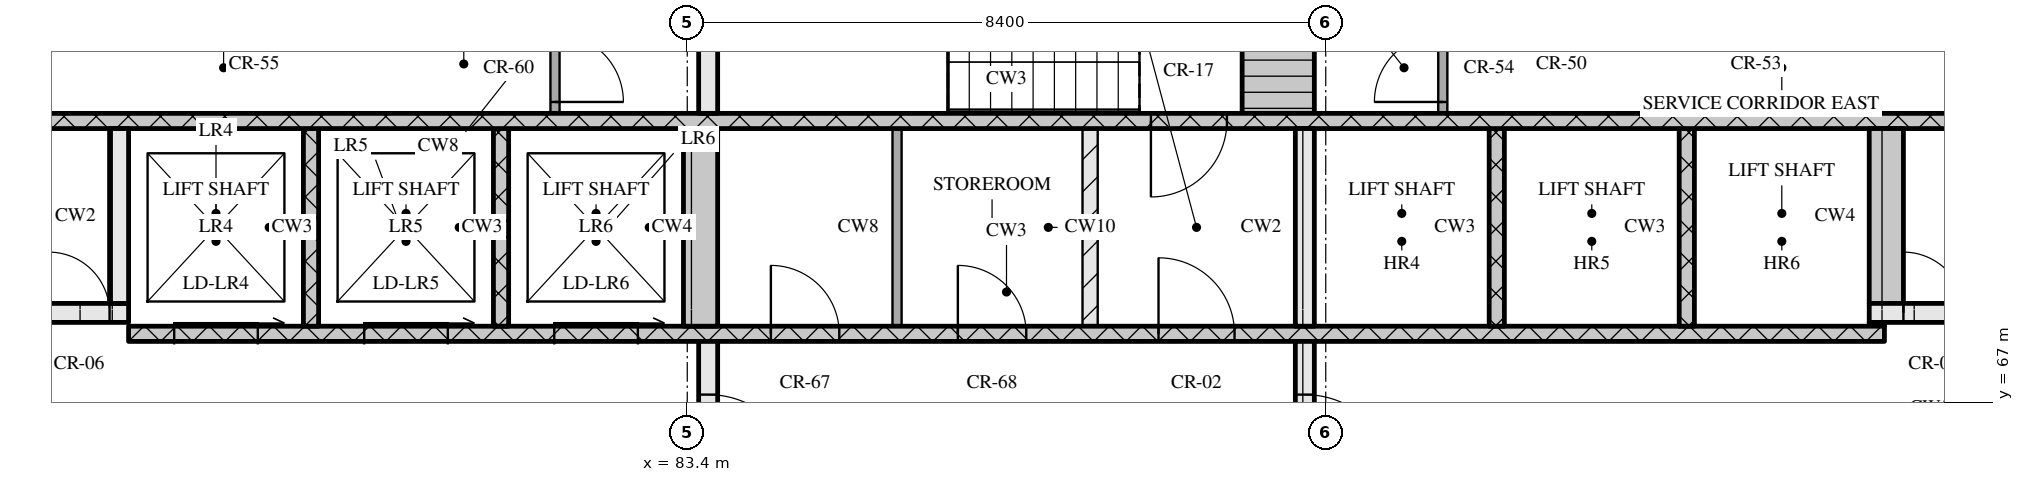
"""IFC4 building model, lengths in metres.
Left out: names, types, materials, properties, quantities, classifications, styles, units other than length and angle.
Written with IfcOpenShell. Run it as: python <this file> out.ifc"""

import sys

from ifc_helpers import new_model, si_unit, direction, frame, frame_2d, origin, place, context, subcontext, project, spatial, rectangle, extrude, element, fill, save


model = new_model("IFC4")
c1 = context("Model", 3, precision=1e-05, world=origin(), true_north=direction((0.0, 1.0)))
c2 = subcontext(c1, "Body", "Model", "MODEL_VIEW")
j1 = project(units=[si_unit("LENGTHUNIT", "METRE"), si_unit("PLANEANGLEUNIT", "RADIAN")], contexts=[c1])
p1 = place(None, origin())
s1 = spatial("IfcSite", under=j1, at=p1, CompositionType="ELEMENT")
p2 = place(p1, origin())
s2 = spatial("IfcBuilding", under=s1, at=p2, CompositionType="ELEMENT")
p3 = place(p2, frame((0.0, 0.0, 95.25)))
s3 = spatial("IfcBuildingStorey", under=s2, at=p3, CompositionType="ELEMENT", Elevation=95.25)
p4 = place(p3, frame((83.675, 65.2, 0.0), z_axis=(0.0, 0.0, 1.0), x_axis=(0.0, 1.0, 0.0)))
e1 = element("IfcWall", 1, at=p4, inside=s3, PredefinedType="SOLIDWALL", context=c2, shape_type="SweptSolid", body=[
    extrude(rectangle(XDim=2.6, YDim=0.25, at=frame_2d((1.3, 0.0))), origin(), (0.0, 0.0, 1.0), 3.32),
])
p5 = place(p4, frame((0.7, 0.0, 0.0)))
e2 = element("IfcOpeningElement", 2, at=p5, cuts=e1, PredefinedType="OPENING", context=c2, shape_type="SweptSolid", body=[
    extrude(rectangle(XDim=1.2, YDim=2.1, at=frame_2d((0.6, 1.05))), frame((0.0, 0.135, 0.0), z_axis=(0.0, -1.0, 0.0), x_axis=(1.0, 0.0, 0.0)), (0.0, 0.0, 1.0), 0.27),
])
p6 = place(p3, frame((91.525, 65.2, 0.0), z_axis=(0.0, 0.0, 1.0), x_axis=(0.0, 1.0, 0.0)))
e3 = element("IfcWall", 3, at=p6, inside=s3, PredefinedType="SOLIDWALL", context=c2, shape_type="SweptSolid", body=[
    extrude(rectangle(XDim=2.6, YDim=0.25, at=frame_2d((1.3, 0.0))), origin(), (0.0, 0.0, 1.0), 3.32),
])
p7 = place(p6, frame((0.7, 0.0, 0.0)))
e4 = element("IfcOpeningElement", 4, at=p7, cuts=e3, PredefinedType="OPENING", context=c2, shape_type="SweptSolid", body=[
    extrude(rectangle(XDim=1.2, YDim=2.1, at=frame_2d((0.6, 1.05))), frame((0.0, 0.135, 0.0), z_axis=(0.0, -1.0, 0.0), x_axis=(1.0, 0.0, 0.0)), (0.0, 0.0, 1.0), 0.27),
])
p8 = place(p3, frame((76.05, 67.9, 0.0), z_axis=(0.0, 0.0, 1.0), x_axis=(1.0, 0.0, 0.0)))
e5 = element("IfcWall", 5, at=p8, inside=s3, PredefinedType="SOLIDWALL", context=c2, shape_type="SweptSolid", body=[
    extrude(rectangle(XDim=23.1, YDim=0.2, at=frame_2d((11.55, 0.0))), origin(), (0.0, 0.0, 1.0), 3.32),
])
p9 = place(p8, frame((0.6, 0.0, 0.0)))
e6 = element("IfcOpeningElement", 6, at=p9, cuts=e5, PredefinedType="OPENING", context=c2, shape_type="SweptSolid", body=[
    extrude(rectangle(XDim=1.1, YDim=2.1, at=frame_2d((0.55, 1.05))), frame((0.0, 0.11, 0.0), z_axis=(0.0, -1.0, 0.0), x_axis=(1.0, 0.0, 0.0)), (0.0, 0.0, 1.0), 0.22),
])
p10 = place(p8, frame((3.1, 0.0, 0.0)))
e7 = element("IfcOpeningElement", 7, at=p10, cuts=e5, PredefinedType="OPENING", context=c2, shape_type="SweptSolid", body=[
    extrude(rectangle(XDim=1.1, YDim=2.1, at=frame_2d((0.55, 1.05))), frame((0.0, 0.11, 0.0), z_axis=(0.0, -1.0, 0.0), x_axis=(1.0, 0.0, 0.0)), (0.0, 0.0, 1.0), 0.22),
])
p11 = place(p8, frame((5.6, 0.0, 0.0)))
e8 = element("IfcOpeningElement", 8, at=p11, cuts=e5, PredefinedType="OPENING", context=c2, shape_type="SweptSolid", body=[
    extrude(rectangle(XDim=1.1, YDim=2.1, at=frame_2d((0.55, 1.05))), frame((0.0, 0.11, 0.0), z_axis=(0.0, -1.0, 0.0), x_axis=(1.0, 0.0, 0.0)), (0.0, 0.0, 1.0), 0.22),
])
p12 = place(p8, frame((8.45, 0.0, 0.0)))
e9 = element("IfcOpeningElement", 9, at=p12, cuts=e5, PredefinedType="OPENING", context=c2, shape_type="SweptSolid", body=[
    extrude(rectangle(XDim=0.9, YDim=2.1, at=frame_2d((0.45, 1.05))), frame((0.0, 0.11, 0.0), z_axis=(0.0, -1.0, 0.0), x_axis=(1.0, 0.0, 0.0)), (0.0, 0.0, 1.0), 0.22),
])
p13 = place(p8, frame((10.91, 0.0, 0.0)))
e10 = element("IfcOpeningElement", 10, at=p13, cuts=e5, PredefinedType="OPENING", context=c2, shape_type="SweptSolid", body=[
    extrude(rectangle(XDim=0.9, YDim=2.1, at=frame_2d((0.45, 1.05))), frame((0.0, 0.11, 0.0), z_axis=(0.0, -1.0, 0.0), x_axis=(1.0, 0.0, 0.0)), (0.0, 0.0, 1.0), 0.22),
])
p14 = place(p8, frame((13.55, 0.0, 0.0)))
e11 = element("IfcOpeningElement", 11, at=p14, cuts=e5, PredefinedType="OPENING", context=c2, shape_type="SweptSolid", body=[
    extrude(rectangle(XDim=1.0, YDim=2.1, at=frame_2d((0.5, 1.05))), frame((0.0, 0.11, 0.0), z_axis=(0.0, -1.0, 0.0), x_axis=(1.0, 0.0, 0.0)), (0.0, 0.0, 1.0), 0.22),
])
for number, where, z_axis, x_axis in (
    (12, (78.45, 68.0, 0.0), (0.0, 0.0, 1.0), (0.0, 1.0, 0.0)),
    (13, (80.95, 68.0, 0.0), (0.0, 0.0, 1.0), (0.0, 1.0, 0.0)),
):
    element("IfcWall", number, at=place(p3, frame(where, z_axis=z_axis, x_axis=x_axis)), inside=s3, PredefinedType="SOLIDWALL", context=c2, shape_type="SweptSolid", body=[
        extrude(rectangle(XDim=2.6, YDim=0.2, at=frame_2d((1.3, 0.0))), origin(), (0.0, 0.0, 1.0), 3.32),
    ])
p15 = place(p3, frame((83.575, 68.0, 0.0), z_axis=(0.0, 0.0, 1.0), x_axis=(0.0, 1.0, 0.0)))
e14 = element("IfcWall", 14, at=p15, inside=s3, PredefinedType="SOLIDWALL", context=c2, shape_type="SweptSolid", body=[
    extrude(rectangle(XDim=2.6, YDim=0.45, at=frame_2d((1.3, 0.0))), origin(), (0.0, 0.0, 1.0), 3.32),
])
p16 = place(p3, frame((86.16, 68.0, 0.0), z_axis=(0.0, 0.0, 1.0), x_axis=(0.0, 1.0, 0.0)))
e15 = element("IfcWall", 15, at=p16, inside=s3, PredefinedType="PARTITIONING", context=c2, shape_type="SweptSolid", body=[
    extrude(rectangle(XDim=2.6, YDim=0.12, at=frame_2d((1.3, 0.0))), origin(), (0.0, 0.0, 1.0), 3.32),
])
p17 = place(p3, frame((88.7, 68.0, 0.0), z_axis=(0.0, 0.0, 1.0), x_axis=(0.0, 1.0, 0.0)))
e16 = element("IfcWall", 16, at=p17, inside=s3, PredefinedType="PARTITIONING", context=c2, shape_type="SweptSolid", body=[
    extrude(rectangle(XDim=2.6, YDim=0.2, at=frame_2d((1.3, 0.0))), origin(), (0.0, 0.0, 1.0), 3.32),
])
p18 = place(p3, frame((91.525, 68.0, 0.0), z_axis=(0.0, 0.0, 1.0), x_axis=(0.0, 1.0, 0.0)))
e17 = element("IfcWall", 17, at=p18, inside=s3, PredefinedType="SOLIDWALL", context=c2, shape_type="SweptSolid", body=[
    extrude(rectangle(XDim=2.6, YDim=0.25, at=frame_2d((1.3, 0.0))), origin(), (0.0, 0.0, 1.0), 3.32),
])
for number, where, z_axis, x_axis in (
    (18, (94.05, 68.0, 0.0), (0.0, 0.0, 1.0), (0.0, 1.0, 0.0)),
    (19, (96.55, 68.0, 0.0), (0.0, 0.0, 1.0), (0.0, 1.0, 0.0)),
):
    element("IfcWall", number, at=place(p3, frame(where, z_axis=z_axis, x_axis=x_axis)), inside=s3, PredefinedType="SOLIDWALL", context=c2, shape_type="SweptSolid", body=[
        extrude(rectangle(XDim=2.6, YDim=0.2, at=frame_2d((1.3, 0.0))), origin(), (0.0, 0.0, 1.0), 3.32),
    ])
p19 = place(p3, frame((98.95, 68.025, 0.0), z_axis=(0.0, 0.0, 1.0), x_axis=(1.0, 0.0, 0.0)))
e20 = element("IfcWall", 20, at=p19, inside=s3, PredefinedType="SOLIDWALL", context=c2, shape_type="SweptSolid", body=[
    extrude(rectangle(XDim=0.2, YDim=0.05, at=frame_2d((0.1, 0.0))), origin(), (0.0, 0.0, 1.0), 3.32),
])
p20 = place(p3, frame((67.8, 68.175, 0.0), z_axis=(0.0, 0.0, 1.0), x_axis=(1.0, 0.0, 0.0)))
e21 = element("IfcWall", 21, at=p20, inside=s3, PredefinedType="SOLIDWALL", context=c2, shape_type="SweptSolid", body=[
    extrude(rectangle(XDim=8.25, YDim=0.25, at=frame_2d((4.125, 0.0))), origin(), (0.0, 0.0, 1.0), 3.32),
])
p21 = place(p20, frame((5.7, 0.0, 0.0)))
e22 = element("IfcOpeningElement", 22, at=p21, cuts=e21, PredefinedType="OPENING", context=c2, shape_type="SweptSolid", body=[
    extrude(rectangle(XDim=1.0, YDim=2.1, at=frame_2d((0.5, 1.05))), frame((0.0, 0.135, 0.0), z_axis=(0.0, -1.0, 0.0), x_axis=(1.0, 0.0, 0.0)), (0.0, 0.0, 1.0), 0.27),
])
p22 = place(p20, frame((7.2, 0.0, 0.0)))
e23 = element("IfcOpeningElement", 23, at=p22, cuts=e21, PredefinedType="OPENING", context=c2, shape_type="SweptSolid", body=[
    extrude(rectangle(XDim=0.8, YDim=2.1, at=frame_2d((0.4, 1.05))), frame((0.0, 0.135, 0.0), z_axis=(0.0, -1.0, 0.0), x_axis=(1.0, 0.0, 0.0)), (0.0, 0.0, 1.0), 0.27),
])
p23 = place(p3, frame((98.95, 68.175, 0.0), z_axis=(0.0, 0.0, 1.0), x_axis=(1.0, 0.0, 0.0)))
e24 = element("IfcWall", 24, at=p23, inside=s3, PredefinedType="SOLIDWALL", context=c2, shape_type="SweptSolid", body=[
    extrude(rectangle(XDim=8.45, YDim=0.25, at=frame_2d((4.225, 0.0))), origin(), (0.0, 0.0, 1.0), 3.32),
])
p24 = place(p23, frame((0.45, 0.0, 0.0)))
e25 = element("IfcOpeningElement", 25, at=p24, cuts=e24, PredefinedType="OPENING", context=c2, shape_type="SweptSolid", body=[
    extrude(rectangle(XDim=0.8, YDim=2.1, at=frame_2d((0.4, 1.05))), frame((0.0, 0.135, 0.0), z_axis=(0.0, -1.0, 0.0), x_axis=(1.0, 0.0, 0.0)), (0.0, 0.0, 1.0), 0.27),
])
p25 = place(p23, frame((1.75, 0.0, 0.0)))
e26 = element("IfcOpeningElement", 26, at=p25, cuts=e24, PredefinedType="OPENING", context=c2, shape_type="SweptSolid", body=[
    extrude(rectangle(XDim=1.0, YDim=2.1, at=frame_2d((0.5, 1.05))), frame((0.0, 0.135, 0.0), z_axis=(0.0, -1.0, 0.0), x_axis=(1.0, 0.0, 0.0)), (0.0, 0.0, 1.0), 0.27),
])
p26 = place(p3, frame((75.925, 68.3, 0.0), z_axis=(0.0, 0.0, 1.0), x_axis=(0.0, 1.0, 0.0)))
e27 = element("IfcWall", 27, at=p26, inside=s3, PredefinedType="SOLIDWALL", context=c2, shape_type="SweptSolid", body=[
    extrude(rectangle(XDim=2.3, YDim=0.25, at=frame_2d((1.15, 0.0))), origin(), (0.0, 0.0, 1.0), 3.32),
])
p27 = place(p3, frame((99.175, 68.3, 0.0), z_axis=(0.0, 0.0, 1.0), x_axis=(0.0, 1.0, 0.0)))
e28 = element("IfcWall", 28, at=p27, inside=s3, PredefinedType="SOLIDWALL", context=c2, shape_type="SweptSolid", body=[
    extrude(rectangle(XDim=2.3, YDim=0.45, at=frame_2d((1.15, 0.0))), origin(), (0.0, 0.0, 1.0), 3.32),
])
p28 = place(p3, frame((67.8, 70.7, 0.0), z_axis=(0.0, 0.0, 1.0), x_axis=(1.0, 0.0, 0.0)))
e29 = element("IfcWall", 29, at=p28, inside=s3, PredefinedType="SOLIDWALL", context=c2, shape_type="SweptSolid", body=[
    extrude(rectangle(XDim=39.6, YDim=0.2, at=frame_2d((19.8, 0.0))), origin(), (0.0, 0.0, 1.0), 3.32),
])
p29 = place(p28, frame((0.65, 0.0, 0.0)))
e30 = element("IfcOpeningElement", 30, at=p29, cuts=e29, PredefinedType="OPENING", context=c2, shape_type="SweptSolid", body=[
    extrude(rectangle(XDim=1.1, YDim=2.1, at=frame_2d((0.55, 1.05))), frame((0.0, 0.11, 0.0), z_axis=(0.0, -1.0, 0.0), x_axis=(1.0, 0.0, 0.0)), (0.0, 0.0, 1.0), 0.22),
])
p30 = place(p28, frame((3.25, 0.0, 0.0)))
e31 = element("IfcOpeningElement", 31, at=p30, cuts=e29, PredefinedType="OPENING", context=c2, shape_type="SweptSolid", body=[
    extrude(rectangle(XDim=1.1, YDim=2.1, at=frame_2d((0.55, 1.05))), frame((0.0, 0.11, 0.0), z_axis=(0.0, -1.0, 0.0), x_axis=(1.0, 0.0, 0.0)), (0.0, 0.0, 1.0), 0.22),
])
p31 = place(p28, frame((5.9, 0.0, 0.0)))
e32 = element("IfcOpeningElement", 32, at=p31, cuts=e29, PredefinedType="OPENING", context=c2, shape_type="SweptSolid", body=[
    extrude(rectangle(XDim=1.0, YDim=2.1, at=frame_2d((0.5, 1.05))), frame((0.0, 0.11, 0.0), z_axis=(0.0, -1.0, 0.0), x_axis=(1.0, 0.0, 0.0)), (0.0, 0.0, 1.0), 0.22),
])
p32 = place(p28, frame((21.7, 0.0, 0.0)))
e33 = element("IfcOpeningElement", 33, at=p32, cuts=e29, PredefinedType="OPENING", context=c2, shape_type="SweptSolid", body=[
    extrude(rectangle(XDim=1.0, YDim=2.1, at=frame_2d((0.5, 1.05))), frame((0.0, 0.11, 0.0), z_axis=(0.0, -1.0, 0.0), x_axis=(1.0, 0.0, 0.0)), (0.0, 0.0, 1.0), 0.22),
])
p33 = place(p28, frame((32.7, 0.0, 0.0)))
e34 = element("IfcOpeningElement", 34, at=p33, cuts=e29, PredefinedType="OPENING", context=c2, shape_type="SweptSolid", body=[
    extrude(rectangle(XDim=1.0, YDim=2.1, at=frame_2d((0.5, 1.05))), frame((0.0, 0.11, 0.0), z_axis=(0.0, -1.0, 0.0), x_axis=(1.0, 0.0, 0.0)), (0.0, 0.0, 1.0), 0.22),
])
p34 = place(p28, frame((35.25, 0.0, 0.0)))
e35 = element("IfcOpeningElement", 35, at=p34, cuts=e29, PredefinedType="OPENING", context=c2, shape_type="SweptSolid", body=[
    extrude(rectangle(XDim=1.1, YDim=2.1, at=frame_2d((0.55, 1.05))), frame((0.0, 0.11, 0.0), z_axis=(0.0, -1.0, 0.0), x_axis=(1.0, 0.0, 0.0)), (0.0, 0.0, 1.0), 0.22),
])
p35 = place(p28, frame((37.85, 0.0, 0.0)))
e36 = element("IfcOpeningElement", 36, at=p35, cuts=e29, PredefinedType="OPENING", context=c2, shape_type="SweptSolid", body=[
    extrude(rectangle(XDim=1.1, YDim=2.1, at=frame_2d((0.55, 1.05))), frame((0.0, 0.11, 0.0), z_axis=(0.0, -1.0, 0.0), x_axis=(1.0, 0.0, 0.0)), (0.0, 0.0, 1.0), 0.22),
])
p36 = place(p3, frame((81.66, 70.8, 0.0), z_axis=(0.0, 0.0, 1.0), x_axis=(0.0, 1.0, 0.0)))
e37 = element("IfcWall", 37, at=p36, inside=s3, PredefinedType="PARTITIONING", context=c2, shape_type="SweptSolid", body=[
    extrude(rectangle(XDim=1.2, YDim=0.12, at=frame_2d((0.6, 0.0))), origin(), (0.0, 0.0, 1.0), 3.32),
])
p37 = place(p36, frame((0.15, 0.0, 0.0)))
e38 = element("IfcOpeningElement", 38, at=p37, cuts=e37, PredefinedType="OPENING", context=c2, shape_type="SweptSolid", body=[
    extrude(rectangle(XDim=0.9, YDim=2.1, at=frame_2d((0.45, 1.05))), frame((0.0, 0.07, 0.0), z_axis=(0.0, -1.0, 0.0), x_axis=(1.0, 0.0, 0.0)), (0.0, 0.0, 1.0), 0.14),
])
p38 = place(p3, frame((83.675, 70.8, 0.0), z_axis=(0.0, 0.0, 1.0), x_axis=(0.0, 1.0, 0.0)))
e39 = element("IfcWall", 39, at=p38, inside=s3, PredefinedType="SOLIDWALL", context=c2, shape_type="SweptSolid", body=[
    extrude(rectangle(XDim=2.95, YDim=0.25, at=frame_2d((1.475, 0.0))), origin(), (0.0, 0.0, 1.0), 3.32),
])
p39 = place(p3, frame((91.175, 70.8, 0.0), z_axis=(0.0, 0.0, 1.0), x_axis=(0.0, 1.0, 0.0)))
e40 = element("IfcWall", 40, at=p39, inside=s3, PredefinedType="SOLIDWALL", context=c2, shape_type="SweptSolid", body=[
    extrude(rectangle(XDim=2.95, YDim=0.95, at=frame_2d((1.475, 0.0))), origin(), (0.0, 0.0, 1.0), 3.32),
])
p40 = place(p3, frame((93.34, 70.8, 0.0), z_axis=(0.0, 0.0, 1.0), x_axis=(0.0, 1.0, 0.0)))
e41 = element("IfcWall", 41, at=p40, inside=s3, PredefinedType="PARTITIONING", context=c2, shape_type="SweptSolid", body=[
    extrude(rectangle(XDim=1.2, YDim=0.12, at=frame_2d((0.6, 0.0))), origin(), (0.0, 0.0, 1.0), 3.32),
])
p41 = place(p40, frame((0.15, 0.0, 0.0)))
e42 = element("IfcOpeningElement", 42, at=p41, cuts=e41, PredefinedType="OPENING", context=c2, shape_type="SweptSolid", body=[
    extrude(rectangle(XDim=0.9, YDim=2.1, at=frame_2d((0.45, 1.05))), frame((0.0, 0.07, 0.0), z_axis=(0.0, -1.0, 0.0), x_axis=(1.0, 0.0, 0.0)), (0.0, 0.0, 1.0), 0.14),
])
p42 = place(p5, origin())
e43 = element("IfcDoor", 43, at=p42, inside=s3, OperationType="SINGLE_SWING_RIGHT", PredefinedType="DOOR", context=c2, shape_type="SweptSolid", body=[
    extrude(rectangle(XDim=1.2, YDim=2.1, at=frame_2d((0.6, 1.05))), frame((0.0, 0.025, 0.0), z_axis=(0.0, -1.0, 0.0), x_axis=(1.0, 0.0, 0.0)), (0.0, 0.0, 1.0), 0.05),
])
fill(e2, e43)
p43 = place(p7, origin())
e44 = element("IfcDoor", 44, at=p43, inside=s3, OperationType="SINGLE_SWING_RIGHT", PredefinedType="DOOR", context=c2, shape_type="SweptSolid", body=[
    extrude(rectangle(XDim=1.2, YDim=2.1, at=frame_2d((0.6, 1.05))), frame((0.0, 0.025, 0.0), z_axis=(0.0, -1.0, 0.0), x_axis=(1.0, 0.0, 0.0)), (0.0, 0.0, 1.0), 0.05),
])
fill(e4, e44)
p44 = place(p9, origin())
e45 = element("IfcDoor", 45, at=p44, inside=s3, OperationType="SLIDING_TO_RIGHT", PredefinedType="DOOR", context=c2, shape_type="SweptSolid", body=[
    extrude(rectangle(XDim=1.1, YDim=2.1, at=frame_2d((0.55, 1.05))), frame((0.0, 0.025, 0.0), z_axis=(0.0, -1.0, 0.0), x_axis=(1.0, 0.0, 0.0)), (0.0, 0.0, 1.0), 0.05),
])
fill(e6, e45)
p45 = place(p10, origin())
e46 = element("IfcDoor", 46, at=p45, inside=s3, OperationType="SLIDING_TO_RIGHT", PredefinedType="DOOR", context=c2, shape_type="SweptSolid", body=[
    extrude(rectangle(XDim=1.1, YDim=2.1, at=frame_2d((0.55, 1.05))), frame((0.0, 0.025, 0.0), z_axis=(0.0, -1.0, 0.0), x_axis=(1.0, 0.0, 0.0)), (0.0, 0.0, 1.0), 0.05),
])
fill(e7, e46)
p46 = place(p11, origin())
e47 = element("IfcDoor", 47, at=p46, inside=s3, OperationType="SLIDING_TO_RIGHT", PredefinedType="DOOR", context=c2, shape_type="SweptSolid", body=[
    extrude(rectangle(XDim=1.1, YDim=2.1, at=frame_2d((0.55, 1.05))), frame((0.0, 0.025, 0.0), z_axis=(0.0, -1.0, 0.0), x_axis=(1.0, 0.0, 0.0)), (0.0, 0.0, 1.0), 0.05),
])
fill(e8, e47)
p47 = place(p12, origin())
e48 = element("IfcDoor", 48, at=p47, inside=s3, OperationType="SINGLE_SWING_LEFT", PredefinedType="DOOR", context=c2, shape_type="SweptSolid", body=[
    extrude(rectangle(XDim=0.9, YDim=2.1, at=frame_2d((0.45, 1.05))), frame((0.0, 0.025, 0.0), z_axis=(0.0, -1.0, 0.0), x_axis=(1.0, 0.0, 0.0)), (0.0, 0.0, 1.0), 0.05),
])
fill(e9, e48)
p48 = place(p13, origin())
e49 = element("IfcDoor", 49, at=p48, inside=s3, OperationType="SINGLE_SWING_LEFT", PredefinedType="DOOR", context=c2, shape_type="SweptSolid", body=[
    extrude(rectangle(XDim=0.9, YDim=2.1, at=frame_2d((0.45, 1.05))), frame((0.0, 0.025, 0.0), z_axis=(0.0, -1.0, 0.0), x_axis=(1.0, 0.0, 0.0)), (0.0, 0.0, 1.0), 0.05),
])
fill(e10, e49)
p49 = place(p14, origin())
e50 = element("IfcDoor", 50, at=p49, inside=s3, OperationType="SINGLE_SWING_LEFT", PredefinedType="DOOR", context=c2, shape_type="SweptSolid", body=[
    extrude(rectangle(XDim=1.0, YDim=2.1, at=frame_2d((0.5, 1.05))), frame((0.0, 0.025, 0.0), z_axis=(0.0, -1.0, 0.0), x_axis=(1.0, 0.0, 0.0)), (0.0, 0.0, 1.0), 0.05),
])
fill(e11, e50)
p50 = place(p22, origin())
e51 = element("IfcDoor", 51, at=p50, inside=s3, OperationType="SINGLE_SWING_LEFT", PredefinedType="DOOR", context=c2, shape_type="SweptSolid", body=[
    extrude(rectangle(XDim=0.8, YDim=2.1, at=frame_2d((0.4, 1.05))), frame((0.0, 0.025, 0.0), z_axis=(0.0, -1.0, 0.0), x_axis=(1.0, 0.0, 0.0)), (0.0, 0.0, 1.0), 0.05),
])
fill(e23, e51)
p51 = place(p24, origin())
e52 = element("IfcDoor", 52, at=p51, inside=s3, OperationType="SINGLE_SWING_LEFT", PredefinedType="DOOR", context=c2, shape_type="SweptSolid", body=[
    extrude(rectangle(XDim=0.8, YDim=2.1, at=frame_2d((0.4, 1.05))), frame((0.0, 0.025, 0.0), z_axis=(0.0, -1.0, 0.0), x_axis=(1.0, 0.0, 0.0)), (0.0, 0.0, 1.0), 0.05),
])
fill(e25, e52)
p52 = place(p32, origin())
e53 = element("IfcDoor", 53, at=p52, inside=s3, OperationType="SINGLE_SWING_RIGHT", PredefinedType="DOOR", context=c2, shape_type="SweptSolid", body=[
    extrude(rectangle(XDim=1.0, YDim=2.1, at=frame_2d((0.5, 1.05))), frame((0.0, 0.025, 0.0), z_axis=(0.0, -1.0, 0.0), x_axis=(1.0, 0.0, 0.0)), (0.0, 0.0, 1.0), 0.05),
])
fill(e33, e53)
p53 = place(p37, origin())
e54 = element("IfcDoor", 54, at=p53, inside=s3, OperationType="SINGLE_SWING_RIGHT", PredefinedType="DOOR", context=c2, shape_type="SweptSolid", body=[
    extrude(rectangle(XDim=0.9, YDim=2.1, at=frame_2d((0.45, 1.05))), frame((0.0, 0.025, 0.0), z_axis=(0.0, -1.0, 0.0), x_axis=(1.0, 0.0, 0.0)), (0.0, 0.0, 1.0), 0.05),
])
fill(e38, e54)
p54 = place(p41, origin())
e55 = element("IfcDoor", 55, at=p54, inside=s3, OperationType="SINGLE_SWING_LEFT", PredefinedType="DOOR", context=c2, shape_type="SweptSolid", body=[
    extrude(rectangle(XDim=0.9, YDim=2.1, at=frame_2d((0.45, 1.05))), frame((0.0, 0.025, 0.0), z_axis=(0.0, -1.0, 0.0), x_axis=(1.0, 0.0, 0.0)), (0.0, 0.0, 1.0), 0.05),
])
fill(e42, e55)
save(model, sys.argv[1])
